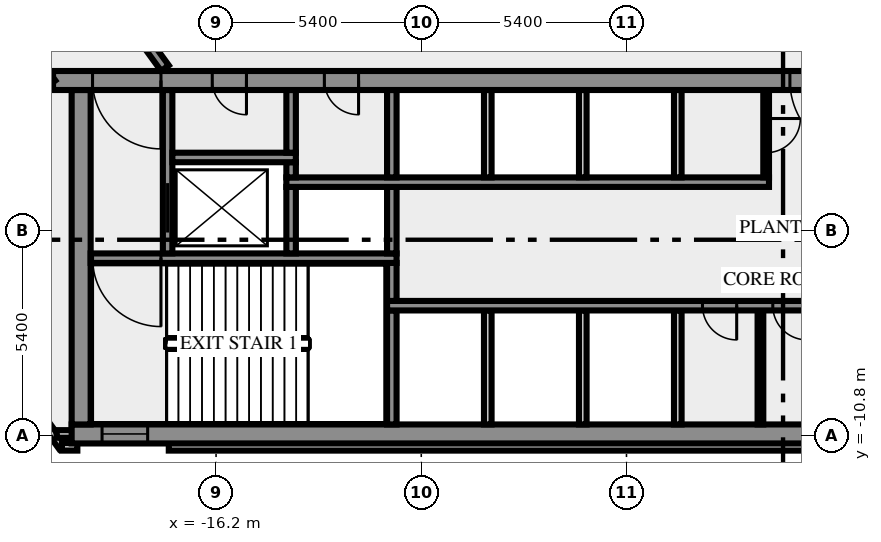
"""IFC4 building model, lengths in metres.
Left out: names, types, materials, properties, quantities, classifications, styles, units other than length and angle.
Written with IfcOpenShell. Run it as: python <this file> out.ifc"""

import sys

from ifc_helpers import new_model, si_unit, direction, frame, frame_2d, origin, place, context, subcontext, project, spatial, rectangle, extrude, element, fill, save


model = new_model("IFC4")
c1 = context("Model", 3, precision=1e-05, world=origin(), true_north=direction((0.0, 1.0)))
c2 = subcontext(c1, "Body", "Model", "MODEL_VIEW")
j1 = project(units=[si_unit("LENGTHUNIT", "METRE"), si_unit("PLANEANGLEUNIT", "RADIAN")], contexts=[c1])
p1 = place(None, origin())
s1 = spatial("IfcSite", under=j1, at=p1, CompositionType="ELEMENT")
p2 = place(p1, origin())
s2 = spatial("IfcBuilding", under=s1, at=p2, CompositionType="ELEMENT")
p3 = place(p2, frame((0.0, 0.0, 133.0)))
s3 = spatial("IfcBuildingStorey", under=s2, at=p3, CompositionType="ELEMENT", Elevation=133.0)
p4 = place(p3, frame((-21.833, -8.909, 0.0), z_axis=(0.0, 0.0, 1.0), x_axis=(0.587766567315, -0.809030569476, 0.0)))
e1 = element("IfcWall", 1, at=p4, inside=s3, PredefinedType="SOLIDWALL", context=c2, shape_type="SweptSolid", body=[
    extrude(rectangle(XDim=2.688, YDim=0.2, at=frame_2d((1.344, 0.0))), origin(), (0.0, 0.0, 1.0), 5.6),
])
p5 = place(p3, frame((-20.256, -11.088, 0.0), z_axis=(0.0, 0.0, 1.0), x_axis=(1.0, 0.0, 0.0)))
e2 = element("IfcWall", 2, at=p5, inside=s3, PredefinedType="SOLIDWALL", context=c2, shape_type="SweptSolid", body=[
    extrude(rectangle(XDim=0.406, YDim=0.2, at=frame_2d((0.203, 0.0))), origin(), (0.0, 0.0, 1.0), 5.6),
])
p6 = place(p3, frame((-17.444, -11.088, 0.0), z_axis=(0.0, 0.0, 1.0), x_axis=(1.0, 0.0, 0.0)))
e3 = element("IfcWall", 3, at=p6, inside=s3, PredefinedType="SOLIDWALL", context=c2, shape_type="SweptSolid", body=[
    extrude(rectangle(XDim=34.888, YDim=0.2, at=frame_2d((17.444, 0.0))), origin(), (0.0, 0.0, 1.0), 5.6),
])
p7 = place(p3, frame((-19.98, -10.75, 0.0), z_axis=(0.0, 0.0, 1.0), x_axis=(-1.0, 0.0, 0.0)))
e4 = element("IfcWall", 4, at=p7, inside=s3, PredefinedType="SOLIDWALL", context=c2, shape_type="SweptSolid", body=[
    extrude(rectangle(XDim=0.417, YDim=0.2, at=frame_2d((0.208, 0.0))), origin(), (0.0, 0.0, 1.0), 5.6),
])
p8 = place(p3, frame((-20.0, -10.75, 0.0), z_axis=(0.0, 0.0, 1.0), x_axis=(1.0, 0.0, 0.0)))
e5 = element("IfcWall", 5, at=p8, inside=s3, PredefinedType="SHEAR", context=c2, shape_type="SweptSolid", body=[
    extrude(rectangle(XDim=40.0, YDim=0.5, at=frame_2d((20.0, 0.0))), origin(), (0.0, 0.0, 1.0), 5.6),
])
p9 = place(p8, frame((0.8, 0.0, 1.0)))
e6 = element("IfcOpeningElement", 6, at=p9, cuts=e5, PredefinedType="OPENING", context=c2, shape_type="SweptSolid", body=[
    extrude(rectangle(XDim=1.2, YDim=1.2, at=frame_2d((0.6, 0.6))), frame((0.0, 0.26, 0.0), z_axis=(0.0, -1.0, 0.0), x_axis=(1.0, 0.0, 0.0)), (0.0, 0.0, 1.0), 0.52),
])
p10 = place(p8, frame((38.0, 0.0, 1.0)))
e7 = element("IfcOpeningElement", 7, at=p10, cuts=e5, PredefinedType="OPENING", context=c2, shape_type="SweptSolid", body=[
    extrude(rectangle(XDim=1.2, YDim=1.2, at=frame_2d((0.6, 0.6))), frame((0.0, 0.26, 0.0), z_axis=(0.0, -1.0, 0.0), x_axis=(1.0, 0.0, 0.0)), (0.0, 0.0, 1.0), 0.52),
])
p11 = place(p3, frame((-19.75, -10.5, 0.0), z_axis=(0.0, 0.0, 1.0), x_axis=(0.0, 1.0, 0.0)))
e8 = element("IfcWall", 8, at=p11, inside=s3, PredefinedType="SHEAR", context=c2, shape_type="SweptSolid", body=[
    extrude(rectangle(XDim=8.8, YDim=0.5, at=frame_2d((4.4, 0.0))), origin(), (0.0, 0.0, 1.0), 5.6),
])
p12 = place(p3, frame((-11.575, -10.5, 0.0), z_axis=(0.0, 0.0, 1.0), x_axis=(0.0, 1.0, 0.0)))
e9 = element("IfcWall", 9, at=p12, inside=s3, PredefinedType="SHEAR", context=c2, shape_type="SweptSolid", body=[
    extrude(rectangle(XDim=3.0, YDim=0.25, at=frame_2d((1.5, 0.0))), origin(), (0.0, 0.0, 1.0), 5.6),
])
for number, where, z_axis, x_axis in (
    (10, (-9.05, -10.5, 0.0), (0.0, 0.0, 1.0), (0.0, 1.0, 0.0)),
    (11, (-6.55, -10.5, 0.0), (0.0, 0.0, 1.0), (0.0, 1.0, 0.0)),
    (12, (-4.05, -10.5, 0.0), (0.0, 0.0, 1.0), (0.0, 1.0, 0.0)),
):
    element("IfcWall", number, at=place(p3, frame(where, z_axis=z_axis, x_axis=x_axis)), inside=s3, PredefinedType="SOLIDWALL", context=c2, shape_type="SweptSolid", body=[
        extrude(rectangle(XDim=3.0, YDim=0.2, at=frame_2d((1.5, 0.0))), origin(), (0.0, 0.0, 1.0), 5.6),
    ])
p13 = place(p3, frame((-1.875, -10.5, 0.0), z_axis=(0.0, 0.0, 1.0), x_axis=(0.0, 1.0, 0.0)))
e13 = element("IfcWall", 13, at=p13, inside=s3, PredefinedType="PARTITIONING", context=c2, shape_type="SweptSolid", body=[
    extrude(rectangle(XDim=3.0, YDim=0.15, at=frame_2d((1.5, 0.0))), origin(), (0.0, 0.0, 1.0), 5.6),
])
p14 = place(p3, frame((11.7, -7.375, 0.0), z_axis=(0.0, 0.0, 1.0), x_axis=(-1.0, 0.0, 0.0)))
e14 = element("IfcWall", 14, at=p14, inside=s3, PredefinedType="SHEAR", context=c2, shape_type="SweptSolid", body=[
    extrude(rectangle(XDim=23.4, YDim=0.25, at=frame_2d((11.7, 0.0))), origin(), (0.0, 0.0, 1.0), 5.6),
])
p15 = place(p14, frame((14.2, 0.0, 0.0)))
e15 = element("IfcOpeningElement", 15, at=p15, cuts=e14, PredefinedType="OPENING", context=c2, shape_type="SweptSolid", body=[
    extrude(rectangle(XDim=0.9, YDim=2.1, at=frame_2d((0.45, 1.05))), frame((0.0, 0.135, 0.0), z_axis=(0.0, -1.0, 0.0), x_axis=(1.0, 0.0, 0.0)), (0.0, 0.0, 1.0), 0.27),
])
p16 = place(p14, frame((12.35, 0.0, 0.0)))
e16 = element("IfcOpeningElement", 16, at=p16, cuts=e14, PredefinedType="OPENING", context=c2, shape_type="SweptSolid", body=[
    extrude(rectangle(XDim=0.9, YDim=2.1, at=frame_2d((0.45, 1.05))), frame((0.0, 0.135, 0.0), z_axis=(0.0, -1.0, 0.0), x_axis=(1.0, 0.0, 0.0)), (0.0, 0.0, 1.0), 0.27),
])
p17 = place(p14, frame((10.65, 0.0, 0.0)))
e17 = element("IfcOpeningElement", 17, at=p17, cuts=e14, PredefinedType="OPENING", context=c2, shape_type="SweptSolid", body=[
    extrude(rectangle(XDim=0.9, YDim=2.1, at=frame_2d((0.45, 1.05))), frame((0.0, 0.135, 0.0), z_axis=(0.0, -1.0, 0.0), x_axis=(1.0, 0.0, 0.0)), (0.0, 0.0, 1.0), 0.27),
])
p18 = place(p3, frame((-11.575, -7.25, 0.0), z_axis=(0.0, 0.0, 1.0), x_axis=(0.0, 1.0, 0.0)))
e18 = element("IfcWall", 18, at=p18, inside=s3, PredefinedType="SHEAR", context=c2, shape_type="SweptSolid", body=[
    extrude(rectangle(XDim=1.0, YDim=0.25, at=frame_2d((0.5, 0.0))), origin(), (0.0, 0.0, 1.0), 5.6),
])
p19 = place(p3, frame((-11.45, -6.125, 0.0), z_axis=(0.0, 0.0, 1.0), x_axis=(-1.0, 0.0, 0.0)))
e19 = element("IfcWall", 19, at=p19, inside=s3, PredefinedType="SHEAR", context=c2, shape_type="SweptSolid", body=[
    extrude(rectangle(XDim=8.05, YDim=0.25, at=frame_2d((4.025, 0.0))), origin(), (0.0, 0.0, 1.0), 5.6),
])
p20 = place(p19, frame((6.2, 0.0, 0.0)))
e20 = element("IfcOpeningElement", 20, at=p20, cuts=e19, PredefinedType="OPENING", context=c2, shape_type="SweptSolid", body=[
    extrude(rectangle(XDim=1.8, YDim=2.1, at=frame_2d((0.9, 1.05))), frame((0.0, 0.135, 0.0), z_axis=(0.0, -1.0, 0.0), x_axis=(1.0, 0.0, 0.0)), (0.0, 0.0, 1.0), 0.27),
])
p21 = place(p3, frame((-17.475, -6.0, 0.0), z_axis=(0.0, 0.0, 1.0), x_axis=(0.0, 1.0, 0.0)))
e21 = element("IfcWall", 21, at=p21, inside=s3, PredefinedType="SHEAR", context=c2, shape_type="SweptSolid", body=[
    extrude(rectangle(XDim=4.3, YDim=0.25, at=frame_2d((2.15, 0.0))), origin(), (0.0, 0.0, 1.0), 5.6),
])
p22 = place(p21, frame((0.55, 0.0, 0.0)))
e22 = element("IfcOpeningElement", 22, at=p22, cuts=e21, PredefinedType="OPENING", context=c2, shape_type="SweptSolid", body=[
    extrude(rectangle(XDim=1.3, YDim=2.1, at=frame_2d((0.65, 1.05))), frame((0.0, 0.135, 0.0), z_axis=(0.0, -1.0, 0.0), x_axis=(1.0, 0.0, 0.0)), (0.0, 0.0, 1.0), 0.27),
])
for number, where, z_axis, x_axis in (
    (23, (-14.225, -6.0, 0.0), (0.0, 0.0, 1.0), (0.0, 1.0, 0.0)),
    (24, (-11.575, -6.0, 0.0), (0.0, 0.0, 1.0), (0.0, 1.0, 0.0)),
):
    element("IfcWall", number, at=place(p3, frame(where, z_axis=z_axis, x_axis=x_axis)), inside=s3, PredefinedType="SHEAR", context=c2, shape_type="SweptSolid", body=[
        extrude(rectangle(XDim=1.75, YDim=0.25, at=frame_2d((0.875, 0.0))), origin(), (0.0, 0.0, 1.0), 5.6),
    ])
p23 = place(p3, frame((-14.35, -4.125, 0.0), z_axis=(0.0, 0.0, 1.0), x_axis=(1.0, 0.0, 0.0)))
e25 = element("IfcWall", 25, at=p23, inside=s3, PredefinedType="SHEAR", context=c2, shape_type="SweptSolid", body=[
    extrude(rectangle(XDim=12.7, YDim=0.25, at=frame_2d((6.35, 0.0))), origin(), (0.0, 0.0, 1.0), 5.6),
])
p24 = place(p3, frame((-14.225, -4.0, 0.0), z_axis=(0.0, 0.0, 1.0), x_axis=(0.0, 1.0, 0.0)))
e26 = element("IfcWall", 26, at=p24, inside=s3, PredefinedType="SHEAR", context=c2, shape_type="SweptSolid", body=[
    extrude(rectangle(XDim=0.4, YDim=0.25, at=frame_2d((0.2, 0.0))), origin(), (0.0, 0.0, 1.0), 5.6),
])
p25 = place(p3, frame((-11.575, -4.0, 0.0), z_axis=(0.0, 0.0, 1.0), x_axis=(0.0, 1.0, 0.0)))
e27 = element("IfcWall", 27, at=p25, inside=s3, PredefinedType="SHEAR", context=c2, shape_type="SweptSolid", body=[
    extrude(rectangle(XDim=2.3, YDim=0.25, at=frame_2d((1.15, 0.0))), origin(), (0.0, 0.0, 1.0), 5.6),
])
for number, where, z_axis, x_axis in (
    (28, (-9.05, -4.0, 0.0), (0.0, 0.0, 1.0), (0.0, 1.0, 0.0)),
    (29, (-6.55, -4.0, 0.0), (0.0, 0.0, 1.0), (0.0, 1.0, 0.0)),
    (30, (-4.05, -4.0, 0.0), (0.0, 0.0, 1.0), (0.0, 1.0, 0.0)),
):
    element("IfcWall", number, at=place(p3, frame(where, z_axis=z_axis, x_axis=x_axis)), inside=s3, PredefinedType="SOLIDWALL", context=c2, shape_type="SweptSolid", body=[
        extrude(rectangle(XDim=2.3, YDim=0.2, at=frame_2d((1.15, 0.0))), origin(), (0.0, 0.0, 1.0), 5.6),
    ])
p26 = place(p3, frame((-1.725, -1.7, 0.0), z_axis=(0.0, 0.0, 1.0), x_axis=(0.0, -1.0, 0.0)))
e31 = element("IfcWall", 31, at=p26, inside=s3, PredefinedType="PARTITIONING", context=c2, shape_type="SweptSolid", body=[
    extrude(rectangle(XDim=2.3, YDim=0.15, at=frame_2d((1.15, 0.0))), origin(), (0.0, 0.0, 1.0), 5.6),
])
p27 = place(p26, frame((0.75, 0.0, 0.0)))
e32 = element("IfcOpeningElement", 32, at=p27, cuts=e31, PredefinedType="OPENING", context=c2, shape_type="SweptSolid", body=[
    extrude(rectangle(XDim=0.9, YDim=2.1, at=frame_2d((0.45, 1.05))), frame((0.0, 0.085, 0.0), z_axis=(0.0, -1.0, 0.0), x_axis=(1.0, 0.0, 0.0)), (0.0, 0.0, 1.0), 0.17),
])
p28 = place(p3, frame((-17.35, -3.475, 0.0), z_axis=(0.0, 0.0, 1.0), x_axis=(1.0, 0.0, 0.0)))
e33 = element("IfcWall", 33, at=p28, inside=s3, PredefinedType="SHEAR", context=c2, shape_type="SweptSolid", body=[
    extrude(rectangle(XDim=3.25, YDim=0.25, at=frame_2d((1.625, 0.0))), origin(), (0.0, 0.0, 1.0), 5.6),
])
p29 = place(p3, frame((-14.225, -3.35, 0.0), z_axis=(0.0, 0.0, 1.0), x_axis=(0.0, 1.0, 0.0)))
e34 = element("IfcWall", 34, at=p29, inside=s3, PredefinedType="SHEAR", context=c2, shape_type="SweptSolid", body=[
    extrude(rectangle(XDim=1.65, YDim=0.25, at=frame_2d((0.825, 0.0))), origin(), (0.0, 0.0, 1.0), 5.6),
])
p30 = place(p3, frame((20.49, -1.45, 0.0), z_axis=(0.0, 0.0, 1.0), x_axis=(-1.0, 0.0, 0.0)))
e35 = element("IfcWall", 35, at=p30, inside=s3, PredefinedType="SHEAR", context=c2, shape_type="SweptSolid", body=[
    extrude(rectangle(XDim=40.98, YDim=0.5, at=frame_2d((20.49, 0.0))), origin(), (0.0, 0.0, 1.0), 5.6),
])
p31 = place(p30, frame((38.14, 0.0, 0.0)))
e36 = element("IfcOpeningElement", 36, at=p31, cuts=e35, PredefinedType="OPENING", context=c2, shape_type="SweptSolid", body=[
    extrude(rectangle(XDim=1.8, YDim=2.1, at=frame_2d((0.9, 1.05))), frame((0.0, 0.26, 0.0), z_axis=(0.0, -1.0, 0.0), x_axis=(1.0, 0.0, 0.0)), (0.0, 0.0, 1.0), 0.52),
])
p32 = place(p30, frame((35.89, 0.0, 0.0)))
e37 = element("IfcOpeningElement", 37, at=p32, cuts=e35, PredefinedType="OPENING", context=c2, shape_type="SweptSolid", body=[
    extrude(rectangle(XDim=0.9, YDim=2.1, at=frame_2d((0.45, 1.05))), frame((0.0, 0.26, 0.0), z_axis=(0.0, -1.0, 0.0), x_axis=(1.0, 0.0, 0.0)), (0.0, 0.0, 1.0), 0.52),
])
p33 = place(p30, frame((32.94, 0.0, 0.0)))
e38 = element("IfcOpeningElement", 38, at=p33, cuts=e35, PredefinedType="OPENING", context=c2, shape_type="SweptSolid", body=[
    extrude(rectangle(XDim=0.9, YDim=2.1, at=frame_2d((0.45, 1.05))), frame((0.0, 0.26, 0.0), z_axis=(0.0, -1.0, 0.0), x_axis=(1.0, 0.0, 0.0)), (0.0, 0.0, 1.0), 0.52),
])
p34 = place(p30, frame((19.59, 0.0, 0.0)))
e39 = element("IfcOpeningElement", 39, at=p34, cuts=e35, PredefinedType="OPENING", context=c2, shape_type="SweptSolid", body=[
    extrude(rectangle(XDim=2.0, YDim=2.1, at=frame_2d((1.0, 1.05))), frame((0.0, 0.26, 0.0), z_axis=(0.0, -1.0, 0.0), x_axis=(1.0, 0.0, 0.0)), (0.0, 0.0, 1.0), 0.52),
])
p35 = place(p30, frame((7.14, 0.0, 0.0)))
e40 = element("IfcOpeningElement", 40, at=p35, cuts=e35, PredefinedType="OPENING", context=c2, shape_type="SweptSolid", body=[
    extrude(rectangle(XDim=0.9, YDim=2.1, at=frame_2d((0.45, 1.05))), frame((0.0, 0.26, 0.0), z_axis=(0.0, -1.0, 0.0), x_axis=(1.0, 0.0, 0.0)), (0.0, 0.0, 1.0), 0.52),
])
p36 = place(p30, frame((5.028, 0.0, 0.0)))
e41 = element("IfcOpeningElement", 41, at=p36, cuts=e35, PredefinedType="OPENING", context=c2, shape_type="SweptSolid", body=[
    extrude(rectangle(XDim=0.8, YDim=2.1, at=frame_2d((0.4, 1.05))), frame((0.0, 0.26, 0.0), z_axis=(0.0, -1.0, 0.0), x_axis=(1.0, 0.0, 0.0)), (0.0, 0.0, 1.0), 0.52),
])
p37 = place(p30, frame((3.452, 0.0, 0.0)))
e42 = element("IfcOpeningElement", 42, at=p37, cuts=e35, PredefinedType="OPENING", context=c2, shape_type="SweptSolid", body=[
    extrude(rectangle(XDim=0.8, YDim=2.1, at=frame_2d((0.4, 1.05))), frame((0.0, 0.26, 0.0), z_axis=(0.0, -1.0, 0.0), x_axis=(1.0, 0.0, 0.0)), (0.0, 0.0, 1.0), 0.52),
])
p38 = place(p30, frame((1.04, 0.0, 0.0)))
e43 = element("IfcOpeningElement", 43, at=p38, cuts=e35, PredefinedType="OPENING", context=c2, shape_type="SweptSolid", body=[
    extrude(rectangle(XDim=1.8, YDim=2.1, at=frame_2d((0.9, 1.05))), frame((0.0, 0.26, 0.0), z_axis=(0.0, -1.0, 0.0), x_axis=(1.0, 0.0, 0.0)), (0.0, 0.0, 1.0), 0.52),
])
p39 = place(p3, frame((-20.531, -1.523, 0.0), z_axis=(0.0, 0.0, 1.0), x_axis=(-0.587786778139, 0.80901588578, 0.0)))
e44 = element("IfcWall", 44, at=p39, inside=s3, PredefinedType="SOLIDWALL", context=c2, shape_type="SweptSolid", body=[
    extrude(rectangle(XDim=34.212, YDim=0.25, at=frame_2d((17.106, 0.0))), origin(), (0.0, 0.0, 1.0), 5.6),
])
p40 = place(p39, frame((20.216, 0.0, 0.0)))
e45 = element("IfcOpeningElement", 45, at=p40, cuts=e44, PredefinedType="OPENING", context=c2, shape_type="SweptSolid", body=[
    extrude(rectangle(XDim=1.8, YDim=2.1, at=frame_2d((0.9, 1.05))), frame((0.0, 0.135, 0.0), z_axis=(0.0, -1.0, 0.0), x_axis=(1.0, 0.0, 0.0)), (0.0, 0.0, 1.0), 0.27),
])
p41 = place(p39, frame((0.483, 0.0, 0.0)))
e46 = element("IfcOpeningElement", 46, at=p41, cuts=e44, PredefinedType="OPENING", context=c2, shape_type="SweptSolid", body=[
    extrude(rectangle(XDim=1.8, YDim=2.1, at=frame_2d((0.9, 1.05))), frame((0.0, 0.135, 0.0), z_axis=(0.0, -1.0, 0.0), x_axis=(1.0, 0.0, 0.0)), (0.0, 0.0, 1.0), 0.27),
])
p42 = place(p39, frame((22.665, 0.0, 0.0)))
e47 = element("IfcOpeningElement", 47, at=p42, cuts=e44, PredefinedType="OPENING", context=c2, shape_type="SweptSolid", body=[
    extrude(rectangle(XDim=1.2, YDim=2.1, at=frame_2d((0.6, 1.05))), frame((0.0, 0.135, 0.0), z_axis=(0.0, -1.0, 0.0), x_axis=(1.0, 0.0, 0.0)), (0.0, 0.0, 1.0), 0.27),
])
p43 = place(p3, frame((-38.44, 27.635, 0.0), z_axis=(0.0, 0.0, 1.0), x_axis=(0.587787785895, -0.809015153599, 0.0)))
e48 = element("IfcWall", 48, at=p43, inside=s3, PredefinedType="SOLIDWALL", context=c2, shape_type="SweptSolid", body=[
    extrude(rectangle(XDim=35.549, YDim=0.25, at=frame_2d((17.775, 0.0))), origin(), (0.0, 0.0, 1.0), 5.6),
])
p44 = place(p43, frame((1.046, 0.0, 0.0)))
e49 = element("IfcOpeningElement", 49, at=p44, cuts=e48, PredefinedType="OPENING", context=c2, shape_type="SweptSolid", body=[
    extrude(rectangle(XDim=1.2, YDim=2.1, at=frame_2d((0.6, 1.05))), frame((0.0, 0.135, 0.0), z_axis=(0.0, -1.0, 0.0), x_axis=(1.0, 0.0, 0.0)), (0.0, 0.0, 1.0), 0.27),
])
p45 = place(p43, frame((30.907, 0.0, 0.0)))
e50 = element("IfcOpeningElement", 50, at=p45, cuts=e48, PredefinedType="OPENING", context=c2, shape_type="SweptSolid", body=[
    extrude(rectangle(XDim=1.2, YDim=2.1, at=frame_2d((0.6, 1.05))), frame((0.0, 0.135, 0.0), z_axis=(0.0, -1.0, 0.0), x_axis=(1.0, 0.0, 0.0)), (0.0, 0.0, 1.0), 0.27),
])
p46 = place(p9, origin())
e51 = element("IfcWindow", 51, at=p46, inside=s3, PartitioningType="SINGLE_PANEL", PredefinedType="WINDOW", context=c2, shape_type="SweptSolid", body=[
    extrude(rectangle(XDim=1.2, YDim=1.2, at=frame_2d((0.6, 0.6))), frame((0.0, 0.03, 0.0), z_axis=(0.0, -1.0, 0.0), x_axis=(1.0, 0.0, 0.0)), (0.0, 0.0, 1.0), 0.06),
])
fill(e6, e51)
p47 = place(p15, origin())
e52 = element("IfcDoor", 52, at=p47, inside=s3, OperationType="SINGLE_SWING_RIGHT", PredefinedType="DOOR", context=c2, shape_type="SweptSolid", body=[
    extrude(rectangle(XDim=0.9, YDim=2.1, at=frame_2d((0.45, 1.05))), frame((0.0, 0.025, 0.0), z_axis=(0.0, -1.0, 0.0), x_axis=(1.0, 0.0, 0.0)), (0.0, 0.0, 1.0), 0.05),
])
fill(e15, e52)
p48 = place(p16, origin())
e53 = element("IfcDoor", 53, at=p48, inside=s3, OperationType="SINGLE_SWING_RIGHT", PredefinedType="DOOR", context=c2, shape_type="SweptSolid", body=[
    extrude(rectangle(XDim=0.9, YDim=2.1, at=frame_2d((0.45, 1.05))), frame((0.0, 0.025, 0.0), z_axis=(0.0, -1.0, 0.0), x_axis=(1.0, 0.0, 0.0)), (0.0, 0.0, 1.0), 0.05),
])
fill(e16, e53)
p49 = place(p20, origin())
e54 = element("IfcDoor", 54, at=p49, inside=s3, OperationType="DOUBLE_DOOR_SINGLE_SWING", PredefinedType="DOOR", context=c2, shape_type="SweptSolid", body=[
    extrude(rectangle(XDim=1.8, YDim=2.1, at=frame_2d((0.9, 1.05))), frame((0.0, 0.025, 0.0), z_axis=(0.0, -1.0, 0.0), x_axis=(1.0, 0.0, 0.0)), (0.0, 0.0, 1.0), 0.05),
])
fill(e20, e54)
p50 = place(p22, origin())
e55 = element("IfcDoor", 55, at=p50, inside=s3, OperationType="DOUBLE_DOOR_SLIDING", PredefinedType="DOOR", context=c2, shape_type="SweptSolid", body=[
    extrude(rectangle(XDim=1.3, YDim=2.1, at=frame_2d((0.65, 1.05))), frame((0.0, 0.025, 0.0), z_axis=(0.0, -1.0, 0.0), x_axis=(1.0, 0.0, 0.0)), (0.0, 0.0, 1.0), 0.05),
])
fill(e22, e55)
p51 = place(p27, origin())
e56 = element("IfcDoor", 56, at=p51, inside=s3, OperationType="SINGLE_SWING_RIGHT", PredefinedType="DOOR", context=c2, shape_type="SweptSolid", body=[
    extrude(rectangle(XDim=0.9, YDim=2.1, at=frame_2d((0.45, 1.05))), frame((0.0, 0.025, 0.0), z_axis=(0.0, -1.0, 0.0), x_axis=(1.0, 0.0, 0.0)), (0.0, 0.0, 1.0), 0.05),
])
fill(e32, e56)
p52 = place(p31, origin())
e57 = element("IfcDoor", 57, at=p52, inside=s3, OperationType="DOUBLE_DOOR_SINGLE_SWING", PredefinedType="DOOR", context=c2, shape_type="SweptSolid", body=[
    extrude(rectangle(XDim=1.8, YDim=2.1, at=frame_2d((0.9, 1.05))), frame((0.0, 0.025, 0.0), z_axis=(0.0, -1.0, 0.0), x_axis=(1.0, 0.0, 0.0)), (0.0, 0.0, 1.0), 0.05),
])
fill(e36, e57)
p53 = place(p32, origin())
e58 = element("IfcDoor", 58, at=p53, inside=s3, OperationType="SINGLE_SWING_RIGHT", PredefinedType="DOOR", context=c2, shape_type="SweptSolid", body=[
    extrude(rectangle(XDim=0.9, YDim=2.1, at=frame_2d((0.45, 1.05))), frame((0.0, 0.025, 0.0), z_axis=(0.0, -1.0, 0.0), x_axis=(1.0, 0.0, 0.0)), (0.0, 0.0, 1.0), 0.05),
])
fill(e37, e58)
p54 = place(p33, origin())
e59 = element("IfcDoor", 59, at=p54, inside=s3, OperationType="SINGLE_SWING_RIGHT", PredefinedType="DOOR", context=c2, shape_type="SweptSolid", body=[
    extrude(rectangle(XDim=0.9, YDim=2.1, at=frame_2d((0.45, 1.05))), frame((0.0, 0.025, 0.0), z_axis=(0.0, -1.0, 0.0), x_axis=(1.0, 0.0, 0.0)), (0.0, 0.0, 1.0), 0.05),
])
fill(e38, e59)
p55 = place(p34, origin())
e60 = element("IfcDoor", 60, at=p55, inside=s3, OperationType="DOUBLE_DOOR_SINGLE_SWING", PredefinedType="DOOR", context=c2, shape_type="SweptSolid", body=[
    extrude(rectangle(XDim=2.0, YDim=2.1, at=frame_2d((1.0, 1.05))), frame((0.0, 0.025, 0.0), z_axis=(0.0, -1.0, 0.0), x_axis=(1.0, 0.0, 0.0)), (0.0, 0.0, 1.0), 0.05),
])
fill(e39, e60)
save(model, sys.argv[1])
